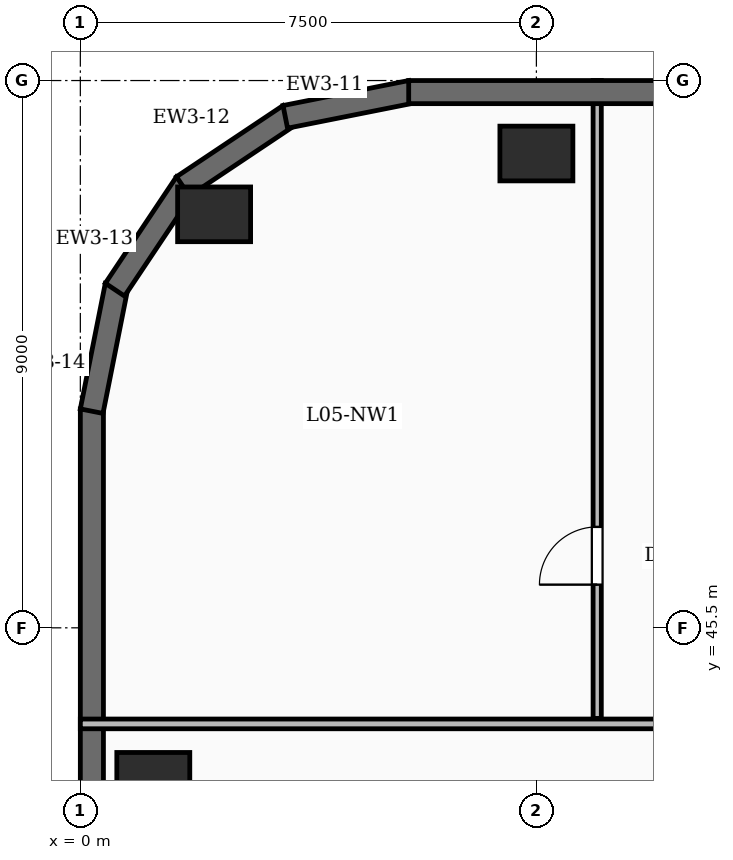
"""IFC4 building model, lengths in metres.
Left out: names, types, materials, properties, quantities, classifications, styles, units other than length and angle.
Written with IfcOpenShell. Run it as: python <this file> out.ifc"""

import sys

from ifc_helpers import new_model, si_unit, direction, frame, frame_2d, origin, origin_2d, place, context, subcontext, project, spatial, rectangle, extrude, element, fill, save


model = new_model("IFC4")
c1 = context("Model", 3, precision=1e-05, world=origin(), true_north=direction((0.0, 1.0)))
c2 = subcontext(c1, "Body", "Model", "MODEL_VIEW")
j1 = project(units=[si_unit("LENGTHUNIT", "METRE"), si_unit("PLANEANGLEUNIT", "RADIAN")], contexts=[c1])
p1 = place(None, origin())
s1 = spatial("IfcSite", under=j1, at=p1, CompositionType="ELEMENT")
p2 = place(p1, origin())
s2 = spatial("IfcBuilding", under=s1, at=p2, CompositionType="ELEMENT")
p3 = place(p2, frame((0.0, 0.0, 28.0)))
s3 = spatial("IfcBuildingStorey", under=s2, at=p3, CompositionType="ELEMENT", Elevation=28.0)
for number, where, z_axis, x_axis in (
    (1, (7.5, 53.3, -0.35), (0.0, 0.0, 1.0), (1.0, 0.0, 0.0)),
    (2, (2.2, 52.3, -0.35), (0.0, 0.0, 1.0), (1.0, 0.0, 0.0)),
    (3, (1.2, 43.0, -0.35), (0.0, 0.0, 1.0), (1.0, 0.0, 0.0)),
):
    element("IfcColumn", number, at=place(p3, frame(where, z_axis=z_axis, x_axis=x_axis)), inside=s3, PredefinedType="COLUMN", context=c2, shape_type="SweptSolid", body=[
        extrude(rectangle(XDim=1.2, YDim=0.9, at=origin_2d()), origin(), (0.0, 0.0, 1.0), 5.9),
    ])
p4 = place(p3, frame((5.4, 54.31, 0.0), z_axis=(0.0, 0.0, 1.0), x_axis=(1.0, 0.0, 0.0)))
e4 = element("IfcWall", 4, at=p4, inside=s3, PredefinedType="SOLIDWALL", context=c2, shape_type="SweptSolid", body=[
    extrude(rectangle(XDim=68.7, YDim=0.38, at=frame_2d((34.35, 0.0))), origin(), (0.0, 0.0, 1.0), 5.55),
])
p5 = place(p4, frame((24.2, 0.0, 0.95)))
e5 = element("IfcOpeningElement", 5, at=p5, cuts=e4, PredefinedType="OPENING", context=c2, shape_type="SweptSolid", body=[
    extrude(rectangle(XDim=2.2, YDim=2.5, at=frame_2d((1.1, 1.25))), frame((0.0, 0.2, 0.0), z_axis=(0.0, -1.0, 0.0), x_axis=(1.0, 0.0, 0.0)), (0.0, 0.0, 1.0), 0.4),
])
p6 = place(p4, frame((35.0, 0.0, 0.95)))
e6 = element("IfcOpeningElement", 6, at=p6, cuts=e4, PredefinedType="OPENING", context=c2, shape_type="SweptSolid", body=[
    extrude(rectangle(XDim=2.2, YDim=2.5, at=frame_2d((1.1, 1.25))), frame((0.0, 0.2, 0.0), z_axis=(0.0, -1.0, 0.0), x_axis=(1.0, 0.0, 0.0)), (0.0, 0.0, 1.0), 0.4),
])
p7 = place(p4, frame((40.4, 0.0, 0.95)))
e7 = element("IfcOpeningElement", 7, at=p7, cuts=e4, PredefinedType="OPENING", context=c2, shape_type="SweptSolid", body=[
    extrude(rectangle(XDim=2.2, YDim=2.5, at=frame_2d((1.1, 1.25))), frame((0.0, 0.2, 0.0), z_axis=(0.0, -1.0, 0.0), x_axis=(1.0, 0.0, 0.0)), (0.0, 0.0, 1.0), 0.4),
])
p8 = place(p4, frame((51.2, 0.0, 0.95)))
e8 = element("IfcOpeningElement", 8, at=p8, cuts=e4, PredefinedType="OPENING", context=c2, shape_type="SweptSolid", body=[
    extrude(rectangle(XDim=2.2, YDim=2.5, at=frame_2d((1.1, 1.25))), frame((0.0, 0.2, 0.0), z_axis=(0.0, -1.0, 0.0), x_axis=(1.0, 0.0, 0.0)), (0.0, 0.0, 1.0), 0.4),
])
for number, where, z_axis, x_axis in (
    (9, (3.371, 53.903, 0.0), (0.0, 0.0, 1.0), (0.981, 0.195, 0.0)),
    (10, (1.687, 52.76, 0.0), (0.0, 0.0, 1.0), (0.832, 0.556, 0.0)),
    (11, (0.569, 51.061, 0.0), (0.0, 0.0, 1.0), (0.556, 0.832, 0.0)),
    (12, (0.186, 49.063, 0.0), (0.0, 0.0, 1.0), (0.195, 0.981, 0.0)),
):
    element("IfcWall", number, at=place(p3, frame(where, z_axis=z_axis, x_axis=x_axis)), inside=s3, PredefinedType="SOLIDWALL", context=c2, shape_type="SweptSolid", body=[
        extrude(rectangle(XDim=2.107, YDim=0.38, at=frame_2d((1.053, 0.0))), origin(), (0.0, 0.0, 1.0), 5.55),
    ])
p9 = place(p3, frame((0.19, 5.4, 0.0), z_axis=(0.0, 0.0, 1.0), x_axis=(0.0, 1.0, 0.0)))
e13 = element("IfcWall", 13, at=p9, inside=s3, PredefinedType="SOLIDWALL", context=c2, shape_type="SweptSolid", body=[
    extrude(rectangle(XDim=43.7, YDim=0.38, at=frame_2d((21.85, 0.0))), origin(), (0.0, 0.0, 1.0), 5.55),
])
p10 = place(p9, frame((8.0, 0.0, 0.95)))
e14 = element("IfcOpeningElement", 14, at=p10, cuts=e13, PredefinedType="OPENING", context=c2, shape_type="SweptSolid", body=[
    extrude(rectangle(XDim=2.2, YDim=2.5, at=frame_2d((1.1, 1.25))), frame((0.0, 0.2, 0.0), z_axis=(0.0, -1.0, 0.0), x_axis=(1.0, 0.0, 0.0)), (0.0, 0.0, 1.0), 0.4),
])
p11 = place(p9, frame((18.8, 0.0, 0.95)))
e15 = element("IfcOpeningElement", 15, at=p11, cuts=e13, PredefinedType="OPENING", context=c2, shape_type="SweptSolid", body=[
    extrude(rectangle(XDim=2.2, YDim=2.5, at=frame_2d((1.1, 1.25))), frame((0.0, 0.2, 0.0), z_axis=(0.0, -1.0, 0.0), x_axis=(1.0, 0.0, 0.0)), (0.0, 0.0, 1.0), 0.4),
])
p12 = place(p9, frame((29.6, 0.0, 0.95)))
e16 = element("IfcOpeningElement", 16, at=p12, cuts=e13, PredefinedType="OPENING", context=c2, shape_type="SweptSolid", body=[
    extrude(rectangle(XDim=2.2, YDim=2.5, at=frame_2d((1.1, 1.25))), frame((0.0, 0.2, 0.0), z_axis=(0.0, -1.0, 0.0), x_axis=(1.0, 0.0, 0.0)), (0.0, 0.0, 1.0), 0.4),
])
p13 = place(p3, frame((8.5, 44.01, 0.0), z_axis=(0.0, 0.0, 1.0), x_axis=(0.0, 1.0, 0.0)))
e17 = element("IfcWall", 17, at=p13, inside=s3, PredefinedType="PARTITIONING", context=c2, shape_type="SweptSolid", body=[
    extrude(rectangle(XDim=10.49, YDim=0.135, at=frame_2d((5.245, 0.0))), origin(), (0.0, 0.0, 1.0), 4.61),
])
p14 = place(p13, frame((2.2, 0.0, 0.0)))
e18 = element("IfcOpeningElement", 18, at=p14, cuts=e17, PredefinedType="OPENING", context=c2, shape_type="SweptSolid", body=[
    extrude(rectangle(XDim=0.95, YDim=2.15, at=frame_2d((0.475, 1.075))), frame((0.0, 0.077, 0.0), z_axis=(0.0, -1.0, 0.0), x_axis=(1.0, 0.0, 0.0)), (0.0, 0.0, 1.0), 0.155),
])
p15 = place(p3, frame((0.0, 43.92, 0.0), z_axis=(0.0, 0.0, 1.0), x_axis=(1.0, 0.0, 0.0)))
e19 = element("IfcWall", 19, at=p15, inside=s3, PredefinedType="PARTITIONING", context=c2, shape_type="SweptSolid", body=[
    extrude(rectangle(XDim=24.8, YDim=0.16, at=frame_2d((12.4, 0.0))), origin(), (0.0, 0.0, 1.0), 4.61),
])
p16 = place(p15, frame((16.67, 0.0, 0.0)))
e20 = element("IfcOpeningElement", 20, at=p16, cuts=e19, PredefinedType="OPENING", context=c2, shape_type="SweptSolid", body=[
    extrude(rectangle(XDim=0.95, YDim=2.15, at=frame_2d((0.475, 1.075))), frame((0.0, 0.09, 0.0), z_axis=(0.0, -1.0, 0.0), x_axis=(1.0, 0.0, 0.0)), (0.0, 0.0, 1.0), 0.18),
])
p17 = place(p15, frame((21.82, 0.0, 0.0)))
e21 = element("IfcOpeningElement", 21, at=p17, cuts=e19, PredefinedType="OPENING", context=c2, shape_type="SweptSolid", body=[
    extrude(rectangle(XDim=0.95, YDim=2.15, at=frame_2d((0.475, 1.075))), frame((0.0, 0.09, 0.0), z_axis=(0.0, -1.0, 0.0), x_axis=(1.0, 0.0, 0.0)), (0.0, 0.0, 1.0), 0.18),
])
p18 = place(p14, origin())
e22 = element("IfcDoor", 22, at=p18, inside=s3, OperationType="SINGLE_SWING_LEFT", PredefinedType="DOOR", context=c2, shape_type="SweptSolid", body=[
    extrude(rectangle(XDim=0.95, YDim=2.15, at=frame_2d((0.475, 1.075))), frame((0.0, 0.025, 0.0), z_axis=(0.0, -1.0, 0.0), x_axis=(1.0, 0.0, 0.0)), (0.0, 0.0, 1.0), 0.05),
])
fill(e18, e22)
save(model, sys.argv[1])
